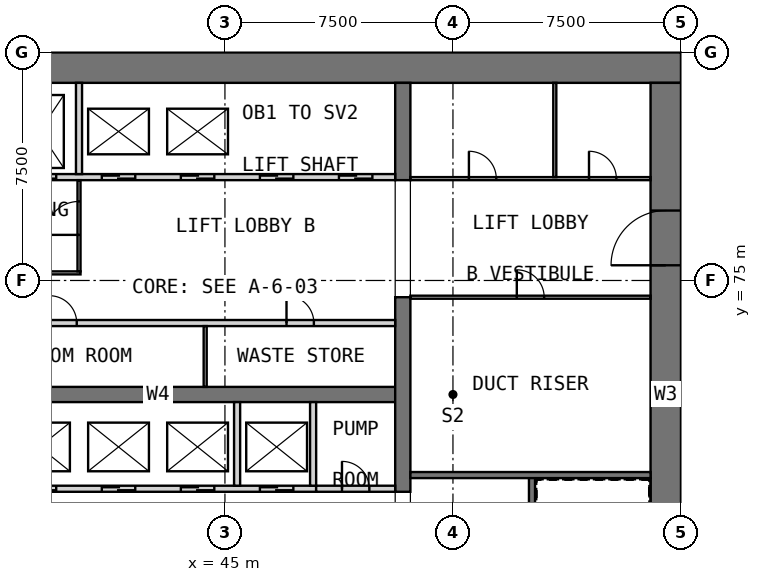
"""IFC4 building model, lengths in metres.
Left out: names, types, materials, properties, quantities, classifications, styles, units other than length and angle.
Written with IfcOpenShell. Run it as: python <this file> out.ifc"""

import sys

from ifc_helpers import new_model, si_unit, direction, frame, frame_2d, origin, place, context, subcontext, project, spatial, rectangle, extrude, element, fill, save


model = new_model("IFC4")
c1 = context("Model", 3, precision=1e-05, world=origin(), true_north=direction((0.0, 1.0)))
c2 = subcontext(c1, "Body", "Model", "MODEL_VIEW")
j1 = project(units=[si_unit("LENGTHUNIT", "METRE"), si_unit("PLANEANGLEUNIT", "RADIAN")], contexts=[c1])
p1 = place(None, origin())
s1 = spatial("IfcSite", under=j1, at=p1, CompositionType="ELEMENT")
p2 = place(p1, origin())
s2 = spatial("IfcBuilding", under=s1, at=p2, CompositionType="ELEMENT")
p3 = place(p2, origin())
s3 = spatial("IfcBuildingStorey", under=s2, at=p3, CompositionType="ELEMENT", Elevation=0.0)
p4 = place(p3, frame((30.0, 82.0, 0.0), z_axis=(0.0, 0.0, 1.0), x_axis=(1.0, 0.0, 0.0)))
e1 = element("IfcWall", 1, at=p4, inside=s3, PredefinedType="SHEAR", context=c2, shape_type="SweptSolid", body=[
    extrude(rectangle(XDim=30.0, YDim=1.0, at=frame_2d((15.0, 0.0))), origin(), (0.0, 0.0, 1.0), 8.0),
])
p5 = place(p3, frame((59.5, 61.0, 0.0), z_axis=(0.0, 0.0, 1.0), x_axis=(0.0, 1.0, 0.0)))
e2 = element("IfcWall", 2, at=p5, inside=s3, PredefinedType="SHEAR", context=c2, shape_type="SweptSolid", body=[
    extrude(rectangle(XDim=20.5, YDim=1.0, at=frame_2d((10.25, 0.0))), origin(), (0.0, 0.0, 1.0), 8.0),
])
p6 = place(p5, frame((14.5, 0.0, 0.0)))
e3 = element("IfcOpeningElement", 3, at=p6, cuts=e2, PredefinedType="OPENING", context=c2, shape_type="SweptSolid", body=[
    extrude(rectangle(XDim=1.8, YDim=2.1, at=frame_2d((0.9, 1.05))), frame((0.0, 0.51, 0.0), z_axis=(0.0, -1.0, 0.0), x_axis=(1.0, 0.0, 0.0)), (0.0, 0.0, 1.0), 1.02),
])
p7 = place(p3, frame((35.0, 71.25, 0.0), z_axis=(0.0, 0.0, 1.0), x_axis=(1.0, 0.0, 0.0)))
e4 = element("IfcWall", 4, at=p7, inside=s3, PredefinedType="SHEAR", context=c2, shape_type="SweptSolid", body=[
    extrude(rectangle(XDim=15.6, YDim=0.5, at=frame_2d((7.8, 0.0))), origin(), (0.0, 0.0, 1.0), 8.0),
])
p8 = place(p3, frame((50.85, 68.05, 0.0), z_axis=(0.0, 0.0, 1.0), x_axis=(0.0, 1.0, 0.0)))
e5 = element("IfcWall", 5, at=p8, inside=s3, PredefinedType="SHEAR", context=c2, shape_type="SweptSolid", body=[
    extrude(rectangle(XDim=6.4, YDim=0.5, at=frame_2d((3.2, 0.0))), origin(), (0.0, 0.0, 1.0), 8.0),
])
p9 = place(p3, frame((50.85, 78.3, 0.0), z_axis=(0.0, 0.0, 1.0), x_axis=(0.0, 1.0, 0.0)))
e6 = element("IfcWall", 6, at=p9, inside=s3, PredefinedType="SHEAR", context=c2, shape_type="SweptSolid", body=[
    extrude(rectangle(XDim=3.2, YDim=0.5, at=frame_2d((1.6, 0.0))), origin(), (0.0, 0.0, 1.0), 8.0),
])
p10 = place(p3, frame((35.0, 68.15, 0.0), z_axis=(0.0, 0.0, 1.0), x_axis=(1.0, 0.0, 0.0)))
e7 = element("IfcWall", 7, at=p10, inside=s3, PredefinedType="SOLIDWALL", context=c2, shape_type="SweptSolid", body=[
    extrude(rectangle(XDim=13.0, YDim=0.2, at=frame_2d((6.5, 0.0))), origin(), (0.0, 0.0, 1.0), 8.0),
])
p11 = place(p10, frame((0.75, 0.0, 0.0)))
e8 = element("IfcOpeningElement", 8, at=p11, cuts=e7, PredefinedType="OPENING", context=c2, shape_type="SweptSolid", body=[
    extrude(rectangle(XDim=1.1, YDim=2.1, at=frame_2d((0.55, 1.05))), frame((0.0, 0.11, 0.0), z_axis=(0.0, -1.0, 0.0), x_axis=(1.0, 0.0, 0.0)), (0.0, 0.0, 1.0), 0.22),
])
p12 = place(p10, frame((3.35, 0.0, 0.0)))
e9 = element("IfcOpeningElement", 9, at=p12, cuts=e7, PredefinedType="OPENING", context=c2, shape_type="SweptSolid", body=[
    extrude(rectangle(XDim=1.1, YDim=2.1, at=frame_2d((0.55, 1.05))), frame((0.0, 0.11, 0.0), z_axis=(0.0, -1.0, 0.0), x_axis=(1.0, 0.0, 0.0)), (0.0, 0.0, 1.0), 0.22),
])
p13 = place(p10, frame((5.95, 0.0, 0.0)))
e10 = element("IfcOpeningElement", 10, at=p13, cuts=e7, PredefinedType="OPENING", context=c2, shape_type="SweptSolid", body=[
    extrude(rectangle(XDim=1.1, YDim=2.1, at=frame_2d((0.55, 1.05))), frame((0.0, 0.11, 0.0), z_axis=(0.0, -1.0, 0.0), x_axis=(1.0, 0.0, 0.0)), (0.0, 0.0, 1.0), 0.22),
])
p14 = place(p10, frame((8.55, 0.0, 0.0)))
e11 = element("IfcOpeningElement", 11, at=p14, cuts=e7, PredefinedType="OPENING", context=c2, shape_type="SweptSolid", body=[
    extrude(rectangle(XDim=1.1, YDim=2.1, at=frame_2d((0.55, 1.05))), frame((0.0, 0.11, 0.0), z_axis=(0.0, -1.0, 0.0), x_axis=(1.0, 0.0, 0.0)), (0.0, 0.0, 1.0), 0.22),
])
p15 = place(p10, frame((11.15, 0.0, 0.0)))
e12 = element("IfcOpeningElement", 12, at=p15, cuts=e7, PredefinedType="OPENING", context=c2, shape_type="SweptSolid", body=[
    extrude(rectangle(XDim=1.1, YDim=2.1, at=frame_2d((0.55, 1.05))), frame((0.0, 0.11, 0.0), z_axis=(0.0, -1.0, 0.0), x_axis=(1.0, 0.0, 0.0)), (0.0, 0.0, 1.0), 0.22),
])
for number, where, z_axis, x_axis in (
    (13, (45.4, 68.25, 0.0), (0.0, 0.0, 1.0), (0.0, 1.0, 0.0)),
    (14, (47.9, 68.25, 0.0), (0.0, 0.0, 1.0), (0.0, 1.0, 0.0)),
):
    element("IfcWall", number, at=place(p3, frame(where, z_axis=z_axis, x_axis=x_axis)), inside=s3, PredefinedType="SOLIDWALL", context=c2, shape_type="SweptSolid", body=[
        extrude(rectangle(XDim=2.75, YDim=0.2, at=frame_2d((1.375, 0.0))), origin(), (0.0, 0.0, 1.0), 8.0),
    ])
p16 = place(p3, frame((48.0, 68.15, 0.0), z_axis=(0.0, 0.0, 1.0), x_axis=(1.0, 0.0, 0.0)))
e15 = element("IfcWall", 15, at=p16, inside=s3, PredefinedType="PARTITIONING", context=c2, shape_type="SweptSolid", body=[
    extrude(rectangle(XDim=2.6, YDim=0.2, at=frame_2d((1.3, 0.0))), origin(), (0.0, 0.0, 1.0), 7.7),
])
p17 = place(p16, frame((0.85, 0.0, 0.0)))
e16 = element("IfcOpeningElement", 16, at=p17, cuts=e15, PredefinedType="OPENING", context=c2, shape_type="SweptSolid", body=[
    extrude(rectangle(XDim=0.9, YDim=2.1, at=frame_2d((0.45, 1.05))), frame((0.0, 0.11, 0.0), z_axis=(0.0, -1.0, 0.0), x_axis=(1.0, 0.0, 0.0)), (0.0, 0.0, 1.0), 0.22),
])
p18 = place(p3, frame((35.0, 73.6, 0.0), z_axis=(0.0, 0.0, 1.0), x_axis=(1.0, 0.0, 0.0)))
e17 = element("IfcWall", 17, at=p18, inside=s3, PredefinedType="PARTITIONING", context=c2, shape_type="SweptSolid", body=[
    extrude(rectangle(XDim=15.6, YDim=0.2, at=frame_2d((7.8, 0.0))), origin(), (0.0, 0.0, 1.0), 7.7),
])
p19 = place(p18, frame((4.225, 0.0, 0.0)))
e18 = element("IfcOpeningElement", 18, at=p19, cuts=e17, PredefinedType="OPENING", context=c2, shape_type="SweptSolid", body=[
    extrude(rectangle(XDim=0.9, YDim=2.1, at=frame_2d((0.45, 1.05))), frame((0.0, 0.11, 0.0), z_axis=(0.0, -1.0, 0.0), x_axis=(1.0, 0.0, 0.0)), (0.0, 0.0, 1.0), 0.22),
])
p20 = place(p18, frame((12.025, 0.0, 0.0)))
e19 = element("IfcOpeningElement", 19, at=p20, cuts=e17, PredefinedType="OPENING", context=c2, shape_type="SweptSolid", body=[
    extrude(rectangle(XDim=0.9, YDim=2.1, at=frame_2d((0.45, 1.05))), frame((0.0, 0.11, 0.0), z_axis=(0.0, -1.0, 0.0), x_axis=(1.0, 0.0, 0.0)), (0.0, 0.0, 1.0), 0.22),
])
p21 = place(p3, frame((44.35, 71.5, 0.0), z_axis=(0.0, 0.0, 1.0), x_axis=(0.0, 1.0, 0.0)))
e20 = element("IfcWall", 20, at=p21, inside=s3, PredefinedType="PARTITIONING", context=c2, shape_type="SweptSolid", body=[
    extrude(rectangle(XDim=2.0, YDim=0.1, at=frame_2d((1.0, 0.0))), origin(), (0.0, 0.0, 1.0), 7.7),
])
p22 = place(p3, frame((35.0, 78.4, 0.0), z_axis=(0.0, 0.0, 1.0), x_axis=(1.0, 0.0, 0.0)))
e21 = element("IfcWall", 21, at=p22, inside=s3, PredefinedType="SOLIDWALL", context=c2, shape_type="SweptSolid", body=[
    extrude(rectangle(XDim=15.6, YDim=0.2, at=frame_2d((7.8, 0.0))), origin(), (0.0, 0.0, 1.0), 8.0),
])
p23 = place(p22, frame((0.75, 0.0, 0.0)))
e22 = element("IfcOpeningElement", 22, at=p23, cuts=e21, PredefinedType="OPENING", context=c2, shape_type="SweptSolid", body=[
    extrude(rectangle(XDim=1.1, YDim=2.1, at=frame_2d((0.55, 1.05))), frame((0.0, 0.11, 0.0), z_axis=(0.0, -1.0, 0.0), x_axis=(1.0, 0.0, 0.0)), (0.0, 0.0, 1.0), 0.22),
])
p24 = place(p22, frame((3.35, 0.0, 0.0)))
e23 = element("IfcOpeningElement", 23, at=p24, cuts=e21, PredefinedType="OPENING", context=c2, shape_type="SweptSolid", body=[
    extrude(rectangle(XDim=1.1, YDim=2.1, at=frame_2d((0.55, 1.05))), frame((0.0, 0.11, 0.0), z_axis=(0.0, -1.0, 0.0), x_axis=(1.0, 0.0, 0.0)), (0.0, 0.0, 1.0), 0.22),
])
p25 = place(p22, frame((5.95, 0.0, 0.0)))
e24 = element("IfcOpeningElement", 24, at=p25, cuts=e21, PredefinedType="OPENING", context=c2, shape_type="SweptSolid", body=[
    extrude(rectangle(XDim=1.1, YDim=2.1, at=frame_2d((0.55, 1.05))), frame((0.0, 0.11, 0.0), z_axis=(0.0, -1.0, 0.0), x_axis=(1.0, 0.0, 0.0)), (0.0, 0.0, 1.0), 0.22),
])
p26 = place(p22, frame((8.55, 0.0, 0.0)))
e25 = element("IfcOpeningElement", 25, at=p26, cuts=e21, PredefinedType="OPENING", context=c2, shape_type="SweptSolid", body=[
    extrude(rectangle(XDim=1.1, YDim=2.1, at=frame_2d((0.55, 1.05))), frame((0.0, 0.11, 0.0), z_axis=(0.0, -1.0, 0.0), x_axis=(1.0, 0.0, 0.0)), (0.0, 0.0, 1.0), 0.22),
])
p27 = place(p22, frame((11.15, 0.0, 0.0)))
e26 = element("IfcOpeningElement", 26, at=p27, cuts=e21, PredefinedType="OPENING", context=c2, shape_type="SweptSolid", body=[
    extrude(rectangle(XDim=1.1, YDim=2.1, at=frame_2d((0.55, 1.05))), frame((0.0, 0.11, 0.0), z_axis=(0.0, -1.0, 0.0), x_axis=(1.0, 0.0, 0.0)), (0.0, 0.0, 1.0), 0.22),
])
p28 = place(p22, frame((13.75, 0.0, 0.0)))
e27 = element("IfcOpeningElement", 27, at=p28, cuts=e21, PredefinedType="OPENING", context=c2, shape_type="SweptSolid", body=[
    extrude(rectangle(XDim=1.1, YDim=2.1, at=frame_2d((0.55, 1.05))), frame((0.0, 0.11, 0.0), z_axis=(0.0, -1.0, 0.0), x_axis=(1.0, 0.0, 0.0)), (0.0, 0.0, 1.0), 0.22),
])
p29 = place(p3, frame((40.2, 78.5, 0.0), z_axis=(0.0, 0.0, 1.0), x_axis=(0.0, 1.0, 0.0)))
e28 = element("IfcWall", 28, at=p29, inside=s3, PredefinedType="SOLIDWALL", context=c2, shape_type="SweptSolid", body=[
    extrude(rectangle(XDim=3.0, YDim=0.2, at=frame_2d((1.5, 0.0))), origin(), (0.0, 0.0, 1.0), 8.0),
])
p30 = place(p3, frame((35.0, 75.25, 0.0), z_axis=(0.0, 0.0, 1.0), x_axis=(1.0, 0.0, 0.0)))
e29 = element("IfcWall", 29, at=p30, inside=s3, PredefinedType="PARTITIONING", context=c2, shape_type="SweptSolid", body=[
    extrude(rectangle(XDim=5.25, YDim=0.1, at=frame_2d((2.625, 0.0))), origin(), (0.0, 0.0, 1.0), 7.7),
])
p31 = place(p3, frame((40.2, 75.3, 0.0), z_axis=(0.0, 0.0, 1.0), x_axis=(0.0, 1.0, 0.0)))
e30 = element("IfcWall", 30, at=p31, inside=s3, PredefinedType="PARTITIONING", context=c2, shape_type="SweptSolid", body=[
    extrude(rectangle(XDim=3.0, YDim=0.1, at=frame_2d((1.5, 0.0))), origin(), (0.0, 0.0, 1.0), 7.7),
])
p32 = place(p31, frame((1.2, 0.0, 0.0)))
e31 = element("IfcOpeningElement", 31, at=p32, cuts=e30, PredefinedType="OPENING", context=c2, shape_type="SweptSolid", body=[
    extrude(rectangle(XDim=1.1, YDim=2.1, at=frame_2d((0.55, 1.05))), frame((0.0, 0.06, 0.0), z_axis=(0.0, -1.0, 0.0), x_axis=(1.0, 0.0, 0.0)), (0.0, 0.0, 1.0), 0.12),
])
p33 = place(p3, frame((55.1, 61.0, 0.0), z_axis=(0.0, 0.0, 1.0), x_axis=(0.0, 1.0, 0.0)))
e32 = element("IfcWall", 32, at=p33, inside=s3, PredefinedType="SOLIDWALL", context=c2, shape_type="SweptSolid", body=[
    extrude(rectangle(XDim=7.6, YDim=0.2, at=frame_2d((3.8, 0.0))), origin(), (0.0, 0.0, 1.0), 7.7),
])
p34 = place(p3, frame((51.1, 68.6, 0.0), z_axis=(0.0, 0.0, 1.0), x_axis=(1.0, 0.0, 0.0)))
e33 = element("IfcWall", 33, at=p34, inside=s3, PredefinedType="SOLIDWALL", context=c2, shape_type="SweptSolid", body=[
    extrude(rectangle(XDim=7.9, YDim=0.2, at=frame_2d((3.95, 0.0))), origin(), (0.0, 0.0, 1.0), 7.7),
])
p35 = place(p3, frame((51.1, 74.45, 0.0), z_axis=(0.0, 0.0, 1.0), x_axis=(1.0, 0.0, 0.0)))
e34 = element("IfcWall", 34, at=p35, inside=s3, PredefinedType="PARTITIONING", context=c2, shape_type="SweptSolid", body=[
    extrude(rectangle(XDim=7.9, YDim=0.1, at=frame_2d((3.95, 0.0))), origin(), (0.0, 0.0, 1.0), 7.7),
])
p36 = place(p35, frame((3.5, 0.0, 0.0)))
e35 = element("IfcOpeningElement", 35, at=p36, cuts=e34, PredefinedType="OPENING", context=c2, shape_type="SweptSolid", body=[
    extrude(rectangle(XDim=0.9, YDim=2.1, at=frame_2d((0.45, 1.05))), frame((0.0, 0.06, 0.0), z_axis=(0.0, -1.0, 0.0), x_axis=(1.0, 0.0, 0.0)), (0.0, 0.0, 1.0), 0.12),
])
p37 = place(p3, frame((51.1, 78.35, 0.0), z_axis=(0.0, 0.0, 1.0), x_axis=(1.0, 0.0, 0.0)))
e36 = element("IfcWall", 36, at=p37, inside=s3, PredefinedType="PARTITIONING", context=c2, shape_type="SweptSolid", body=[
    extrude(rectangle(XDim=7.9, YDim=0.1, at=frame_2d((3.95, 0.0))), origin(), (0.0, 0.0, 1.0), 7.7),
])
p38 = place(p37, frame((1.925, 0.0, 0.0)))
e37 = element("IfcOpeningElement", 37, at=p38, cuts=e36, PredefinedType="OPENING", context=c2, shape_type="SweptSolid", body=[
    extrude(rectangle(XDim=0.9, YDim=2.1, at=frame_2d((0.45, 1.05))), frame((0.0, 0.06, 0.0), z_axis=(0.0, -1.0, 0.0), x_axis=(1.0, 0.0, 0.0)), (0.0, 0.0, 1.0), 0.12),
])
p39 = place(p37, frame((5.875, 0.0, 0.0)))
e38 = element("IfcOpeningElement", 38, at=p39, cuts=e36, PredefinedType="OPENING", context=c2, shape_type="SweptSolid", body=[
    extrude(rectangle(XDim=0.9, YDim=2.1, at=frame_2d((0.45, 1.05))), frame((0.0, 0.06, 0.0), z_axis=(0.0, -1.0, 0.0), x_axis=(1.0, 0.0, 0.0)), (0.0, 0.0, 1.0), 0.12),
])
p40 = place(p3, frame((55.85, 78.4, 0.0), z_axis=(0.0, 0.0, 1.0), x_axis=(0.0, 1.0, 0.0)))
e39 = element("IfcWall", 39, at=p40, inside=s3, PredefinedType="PARTITIONING", context=c2, shape_type="SweptSolid", body=[
    extrude(rectangle(XDim=3.1, YDim=0.1, at=frame_2d((1.55, 0.0))), origin(), (0.0, 0.0, 1.0), 7.7),
])
p41 = place(p12, origin())
e40 = element("IfcDoor", 40, at=p41, inside=s3, OperationType="DOUBLE_DOOR_SLIDING", PredefinedType="DOOR", context=c2, shape_type="SweptSolid", body=[
    extrude(rectangle(XDim=1.1, YDim=2.1, at=frame_2d((0.55, 1.05))), frame((0.0, 0.025, 0.0), z_axis=(0.0, -1.0, 0.0), x_axis=(1.0, 0.0, 0.0)), (0.0, 0.0, 1.0), 0.05),
])
fill(e9, e40)
p42 = place(p13, origin())
e41 = element("IfcDoor", 41, at=p42, inside=s3, OperationType="DOUBLE_DOOR_SLIDING", PredefinedType="DOOR", context=c2, shape_type="SweptSolid", body=[
    extrude(rectangle(XDim=1.1, YDim=2.1, at=frame_2d((0.55, 1.05))), frame((0.0, 0.025, 0.0), z_axis=(0.0, -1.0, 0.0), x_axis=(1.0, 0.0, 0.0)), (0.0, 0.0, 1.0), 0.05),
])
fill(e10, e41)
p43 = place(p14, origin())
e42 = element("IfcDoor", 42, at=p43, inside=s3, OperationType="DOUBLE_DOOR_SLIDING", PredefinedType="DOOR", context=c2, shape_type="SweptSolid", body=[
    extrude(rectangle(XDim=1.1, YDim=2.1, at=frame_2d((0.55, 1.05))), frame((0.0, 0.025, 0.0), z_axis=(0.0, -1.0, 0.0), x_axis=(1.0, 0.0, 0.0)), (0.0, 0.0, 1.0), 0.05),
])
fill(e11, e42)
p44 = place(p15, origin())
e43 = element("IfcDoor", 43, at=p44, inside=s3, OperationType="DOUBLE_DOOR_SLIDING", PredefinedType="DOOR", context=c2, shape_type="SweptSolid", body=[
    extrude(rectangle(XDim=1.1, YDim=2.1, at=frame_2d((0.55, 1.05))), frame((0.0, 0.025, 0.0), z_axis=(0.0, -1.0, 0.0), x_axis=(1.0, 0.0, 0.0)), (0.0, 0.0, 1.0), 0.05),
])
fill(e12, e43)
p45 = place(p17, origin())
e44 = element("IfcDoor", 44, at=p45, inside=s3, OperationType="SINGLE_SWING_RIGHT", PredefinedType="DOOR", context=c2, shape_type="SweptSolid", body=[
    extrude(rectangle(XDim=0.9, YDim=2.1, at=frame_2d((0.45, 1.05))), frame((0.0, 0.025, 0.0), z_axis=(0.0, -1.0, 0.0), x_axis=(1.0, 0.0, 0.0)), (0.0, 0.0, 1.0), 0.05),
])
fill(e16, e44)
p46 = place(p19, origin())
e45 = element("IfcDoor", 45, at=p46, inside=s3, OperationType="SINGLE_SWING_RIGHT", PredefinedType="DOOR", context=c2, shape_type="SweptSolid", body=[
    extrude(rectangle(XDim=0.9, YDim=2.1, at=frame_2d((0.45, 1.05))), frame((0.0, 0.025, 0.0), z_axis=(0.0, -1.0, 0.0), x_axis=(1.0, 0.0, 0.0)), (0.0, 0.0, 1.0), 0.05),
])
fill(e18, e45)
p47 = place(p20, origin())
e46 = element("IfcDoor", 46, at=p47, inside=s3, OperationType="SINGLE_SWING_LEFT", PredefinedType="DOOR", context=c2, shape_type="SweptSolid", body=[
    extrude(rectangle(XDim=0.9, YDim=2.1, at=frame_2d((0.45, 1.05))), frame((0.0, 0.025, 0.0), z_axis=(0.0, -1.0, 0.0), x_axis=(1.0, 0.0, 0.0)), (0.0, 0.0, 1.0), 0.05),
])
fill(e19, e46)
p48 = place(p24, origin())
e47 = element("IfcDoor", 47, at=p48, inside=s3, OperationType="DOUBLE_DOOR_SLIDING", PredefinedType="DOOR", context=c2, shape_type="SweptSolid", body=[
    extrude(rectangle(XDim=1.1, YDim=2.1, at=frame_2d((0.55, 1.05))), frame((0.0, 0.025, 0.0), z_axis=(0.0, -1.0, 0.0), x_axis=(1.0, 0.0, 0.0)), (0.0, 0.0, 1.0), 0.05),
])
fill(e23, e47)
p49 = place(p25, origin())
e48 = element("IfcDoor", 48, at=p49, inside=s3, OperationType="DOUBLE_DOOR_SLIDING", PredefinedType="DOOR", context=c2, shape_type="SweptSolid", body=[
    extrude(rectangle(XDim=1.1, YDim=2.1, at=frame_2d((0.55, 1.05))), frame((0.0, 0.025, 0.0), z_axis=(0.0, -1.0, 0.0), x_axis=(1.0, 0.0, 0.0)), (0.0, 0.0, 1.0), 0.05),
])
fill(e24, e48)
p50 = place(p26, origin())
e49 = element("IfcDoor", 49, at=p50, inside=s3, OperationType="DOUBLE_DOOR_SLIDING", PredefinedType="DOOR", context=c2, shape_type="SweptSolid", body=[
    extrude(rectangle(XDim=1.1, YDim=2.1, at=frame_2d((0.55, 1.05))), frame((0.0, 0.025, 0.0), z_axis=(0.0, -1.0, 0.0), x_axis=(1.0, 0.0, 0.0)), (0.0, 0.0, 1.0), 0.05),
])
fill(e25, e49)
p51 = place(p27, origin())
e50 = element("IfcDoor", 50, at=p51, inside=s3, OperationType="DOUBLE_DOOR_SLIDING", PredefinedType="DOOR", context=c2, shape_type="SweptSolid", body=[
    extrude(rectangle(XDim=1.1, YDim=2.1, at=frame_2d((0.55, 1.05))), frame((0.0, 0.025, 0.0), z_axis=(0.0, -1.0, 0.0), x_axis=(1.0, 0.0, 0.0)), (0.0, 0.0, 1.0), 0.05),
])
fill(e26, e50)
p52 = place(p28, origin())
e51 = element("IfcDoor", 51, at=p52, inside=s3, OperationType="DOUBLE_DOOR_SLIDING", PredefinedType="DOOR", context=c2, shape_type="SweptSolid", body=[
    extrude(rectangle(XDim=1.1, YDim=2.1, at=frame_2d((0.55, 1.05))), frame((0.0, 0.025, 0.0), z_axis=(0.0, -1.0, 0.0), x_axis=(1.0, 0.0, 0.0)), (0.0, 0.0, 1.0), 0.05),
])
fill(e27, e51)
p53 = place(p6, origin())
e52 = element("IfcDoor", 52, at=p53, inside=s3, OperationType="DOUBLE_DOOR_SINGLE_SWING", PredefinedType="DOOR", context=c2, shape_type="SweptSolid", body=[
    extrude(rectangle(XDim=1.8, YDim=2.1, at=frame_2d((0.9, 1.05))), frame((0.0, 0.025, 0.0), z_axis=(0.0, -1.0, 0.0), x_axis=(1.0, 0.0, 0.0)), (0.0, 0.0, 1.0), 0.05),
])
fill(e3, e52)
p54 = place(p32, origin())
e53 = element("IfcDoor", 53, at=p54, inside=s3, OperationType="SINGLE_SWING_LEFT", PredefinedType="DOOR", context=c2, shape_type="SweptSolid", body=[
    extrude(rectangle(XDim=1.1, YDim=2.1, at=frame_2d((0.55, 1.05))), frame((0.0, 0.025, 0.0), z_axis=(0.0, -1.0, 0.0), x_axis=(1.0, 0.0, 0.0)), (0.0, 0.0, 1.0), 0.05),
])
fill(e31, e53)
p55 = place(p36, origin())
e54 = element("IfcDoor", 54, at=p55, inside=s3, OperationType="SINGLE_SWING_RIGHT", PredefinedType="DOOR", context=c2, shape_type="SweptSolid", body=[
    extrude(rectangle(XDim=0.9, YDim=2.1, at=frame_2d((0.45, 1.05))), frame((0.0, 0.025, 0.0), z_axis=(0.0, -1.0, 0.0), x_axis=(1.0, 0.0, 0.0)), (0.0, 0.0, 1.0), 0.05),
])
fill(e35, e54)
p56 = place(p38, origin())
e55 = element("IfcDoor", 55, at=p56, inside=s3, OperationType="SINGLE_SWING_RIGHT", PredefinedType="DOOR", context=c2, shape_type="SweptSolid", body=[
    extrude(rectangle(XDim=0.9, YDim=2.1, at=frame_2d((0.45, 1.05))), frame((0.0, 0.025, 0.0), z_axis=(0.0, -1.0, 0.0), x_axis=(1.0, 0.0, 0.0)), (0.0, 0.0, 1.0), 0.05),
])
fill(e37, e55)
p57 = place(p39, origin())
e56 = element("IfcDoor", 56, at=p57, inside=s3, OperationType="SINGLE_SWING_LEFT", PredefinedType="DOOR", context=c2, shape_type="SweptSolid", body=[
    extrude(rectangle(XDim=0.9, YDim=2.1, at=frame_2d((0.45, 1.05))), frame((0.0, 0.025, 0.0), z_axis=(0.0, -1.0, 0.0), x_axis=(1.0, 0.0, 0.0)), (0.0, 0.0, 1.0), 0.05),
])
fill(e38, e56)
save(model, sys.argv[1])
